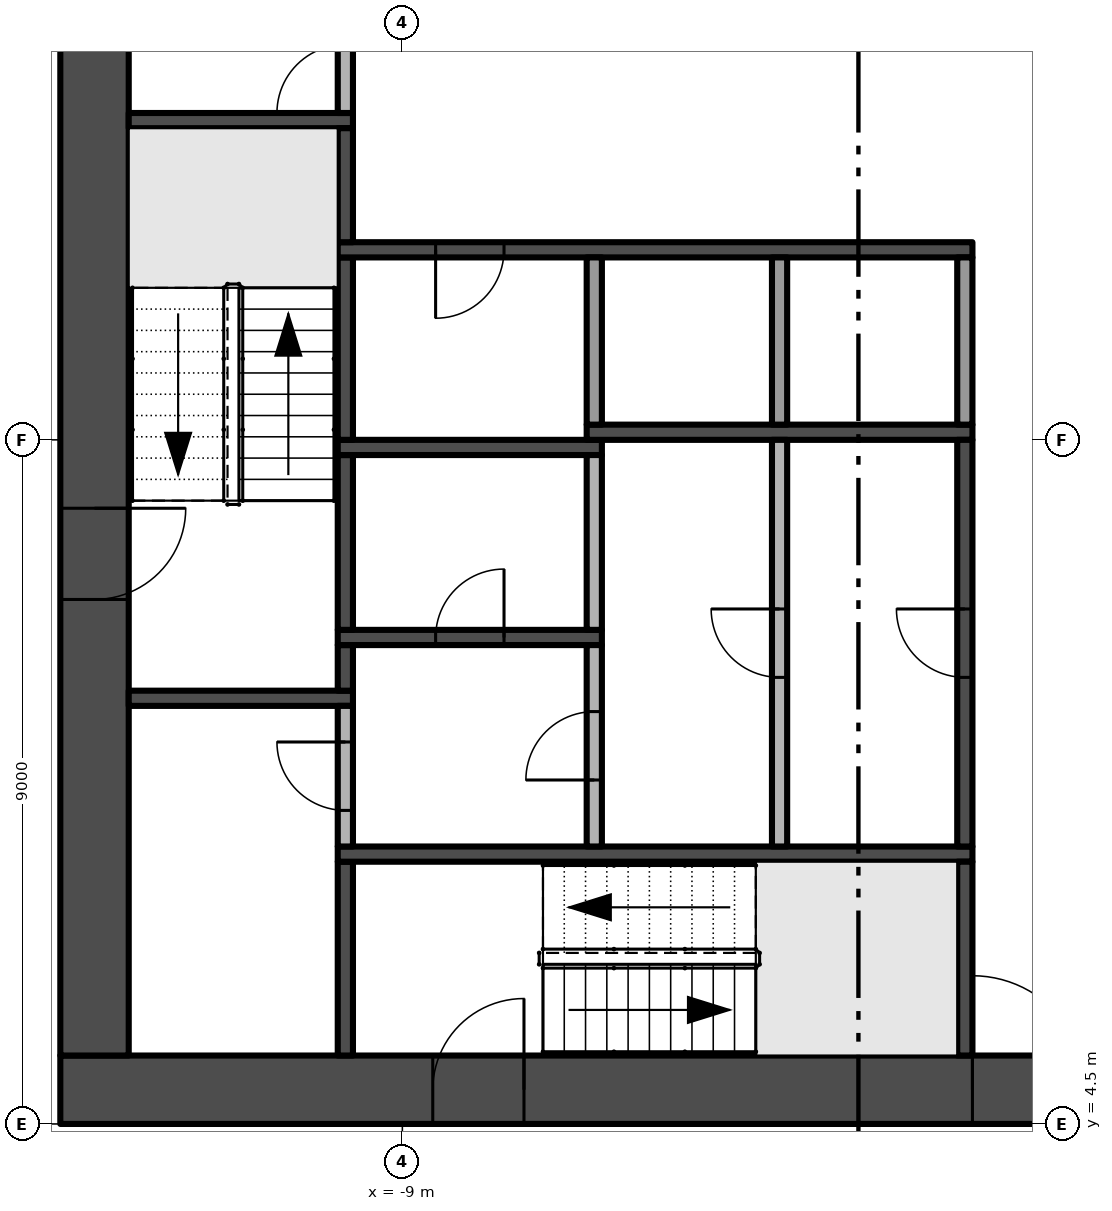
"""IFC4 building model, lengths in metres.
Left out: names, types, materials, properties, quantities, classifications, styles, units other than length and angle.
Written with IfcOpenShell. Run it as: python <this file> out.ifc"""

import sys

from ifc_helpers import new_model, si_unit, direction, frame, frame_2d, origin, place, context, subcontext, project, spatial, rectangle, extrude, element, fill, save


model = new_model("IFC4")
c1 = context("Model", 3, precision=1e-05, world=origin(), true_north=direction((0.0, 1.0)))
c2 = subcontext(c1, "Body", "Model", "MODEL_VIEW")
j1 = project(units=[si_unit("LENGTHUNIT", "METRE"), si_unit("PLANEANGLEUNIT", "RADIAN")], contexts=[c1])
p1 = place(None, origin())
s1 = spatial("IfcSite", under=j1, at=p1, CompositionType="ELEMENT")
p2 = place(p1, origin())
s2 = spatial("IfcBuilding", under=s1, at=p2, CompositionType="ELEMENT")
p3 = place(p2, frame((0.0, 0.0, 34.0)))
s3 = spatial("IfcBuildingStorey", under=s2, at=p3, CompositionType="ELEMENT", Elevation=34.0)
p4 = place(p3, frame((-13.5, 4.95, -0.3), z_axis=(0.0, 0.0, 1.0), x_axis=(1.0, 0.0, 0.0)))
e1 = element("IfcWall", 1, at=p4, inside=s3, PredefinedType="SHEAR", context=c2, shape_type="SweptSolid", body=[
    extrude(rectangle(XDim=27.0, YDim=0.9, at=frame_2d((13.5, 0.0))), origin(), (0.0, 0.0, 1.0), 3.8),
])
p5 = place(p4, frame((12.0, 0.0, 0.3)))
e2 = element("IfcOpeningElement", 2, at=p5, cuts=e1, PredefinedType="OPENING", context=c2, shape_type="SweptSolid", body=[
    extrude(rectangle(XDim=3.0, YDim=2.4, at=frame_2d((1.5, 1.2))), frame((0.0, 0.46, 0.0), z_axis=(0.0, -1.0, 0.0), x_axis=(1.0, 0.0, 0.0)), (0.0, 0.0, 1.0), 0.92),
])
p6 = place(p4, frame((4.9, 0.0, 0.3)))
e3 = element("IfcOpeningElement", 3, at=p6, cuts=e1, PredefinedType="OPENING", context=c2, shape_type="SweptSolid", body=[
    extrude(rectangle(XDim=1.2, YDim=2.2, at=frame_2d((0.6, 1.1))), frame((0.0, 0.46, 0.0), z_axis=(0.0, -1.0, 0.0), x_axis=(1.0, 0.0, 0.0)), (0.0, 0.0, 1.0), 0.92),
])
p7 = place(p4, frame((20.75, 0.0, 0.3)))
e4 = element("IfcOpeningElement", 4, at=p7, cuts=e1, PredefinedType="OPENING", context=c2, shape_type="SweptSolid", body=[
    extrude(rectangle(XDim=1.5, YDim=2.2, at=frame_2d((0.75, 1.1))), frame((0.0, 0.46, 0.0), z_axis=(0.0, -1.0, 0.0), x_axis=(1.0, 0.0, 0.0)), (0.0, 0.0, 1.0), 0.92),
])
p8 = place(p4, frame((17.4, 0.0, 0.3)))
e5 = element("IfcOpeningElement", 5, at=p8, cuts=e1, PredefinedType="OPENING", context=c2, shape_type="SweptSolid", body=[
    extrude(rectangle(XDim=1.2, YDim=2.2, at=frame_2d((0.6, 1.1))), frame((0.0, 0.46, 0.0), z_axis=(0.0, -1.0, 0.0), x_axis=(1.0, 0.0, 0.0)), (0.0, 0.0, 1.0), 0.92),
])
p9 = place(p3, frame((-13.05, 21.6, -0.3), z_axis=(0.0, 0.0, 1.0), x_axis=(0.0, -1.0, 0.0)))
e6 = element("IfcWall", 6, at=p9, inside=s3, PredefinedType="SHEAR", context=c2, shape_type="SweptSolid", body=[
    extrude(rectangle(XDim=16.2, YDim=0.9, at=frame_2d((8.1, 0.0))), origin(), (0.0, 0.0, 1.0), 3.8),
])
p10 = place(p9, frame((9.0, 0.0, 0.3)))
e7 = element("IfcOpeningElement", 7, at=p10, cuts=e6, PredefinedType="OPENING", context=c2, shape_type="SweptSolid", body=[
    extrude(rectangle(XDim=1.2, YDim=2.2, at=frame_2d((0.6, 1.1))), frame((0.0, 0.46, 0.0), z_axis=(0.0, -1.0, 0.0), x_axis=(1.0, 0.0, 0.0)), (0.0, 0.0, 1.0), 0.92),
])
for number, where, z_axis, x_axis in (
    (8, (-12.6, 10.1, 0.0), (0.0, 0.0, 1.0), (1.0, 0.0, 0.0)),
    (9, (-12.6, 17.7, 0.0), (0.0, 0.0, 1.0), (1.0, 0.0, 0.0)),
):
    element("IfcWall", number, at=place(p3, frame(where, z_axis=z_axis, x_axis=x_axis)), inside=s3, PredefinedType="SHEAR", context=c2, shape_type="SweptSolid", body=[
        extrude(rectangle(XDim=2.95, YDim=0.2, at=frame_2d((1.475, 0.0))), origin(), (0.0, 0.0, 1.0), 3.5),
    ])
p11 = place(p3, frame((-9.75, 5.4, 0.0), z_axis=(0.0, 0.0, 1.0), x_axis=(0.0, 1.0, 0.0)))
e10 = element("IfcWall", 10, at=p11, inside=s3, PredefinedType="SHEAR", context=c2, shape_type="SweptSolid", body=[
    extrude(rectangle(XDim=2.55, YDim=0.2, at=frame_2d((1.275, 0.0))), origin(), (0.0, 0.0, 1.0), 3.5),
])
p12 = place(p3, frame((-9.85, 8.05, 0.0), z_axis=(0.0, 0.0, 1.0), x_axis=(1.0, 0.0, 0.0)))
e11 = element("IfcWall", 11, at=p12, inside=s3, PredefinedType="SHEAR", context=c2, shape_type="SweptSolid", body=[
    extrude(rectangle(XDim=8.35, YDim=0.2, at=frame_2d((4.175, 0.0))), origin(), (0.0, 0.0, 1.0), 3.5),
])
p13 = place(p3, frame((-9.75, 8.15, 0.0), z_axis=(0.0, 0.0, 1.0), x_axis=(0.0, 1.0, 0.0)))
e12 = element("IfcWall", 12, at=p13, inside=s3, PredefinedType="PARTITIONING", context=c2, shape_type="SweptSolid", body=[
    extrude(rectangle(XDim=1.85, YDim=0.2, at=frame_2d((0.925, 0.0))), origin(), (0.0, 0.0, 1.0), 3.5),
])
p14 = place(p13, frame((0.475, 0.0, 0.0)))
e13 = element("IfcOpeningElement", 13, at=p14, cuts=e12, PredefinedType="OPENING", context=c2, shape_type="SweptSolid", body=[
    extrude(rectangle(XDim=0.9, YDim=2.1, at=frame_2d((0.45, 1.05))), frame((0.0, 0.11, 0.0), z_axis=(0.0, -1.0, 0.0), x_axis=(1.0, 0.0, 0.0)), (0.0, 0.0, 1.0), 0.22),
])
p15 = place(p3, frame((-9.75, 10.2, 0.0), z_axis=(0.0, 0.0, 1.0), x_axis=(0.0, 1.0, 0.0)))
e14 = element("IfcWall", 14, at=p15, inside=s3, PredefinedType="SHEAR", context=c2, shape_type="SweptSolid", body=[
    extrude(rectangle(XDim=0.6, YDim=0.2, at=frame_2d((0.3, 0.0))), origin(), (0.0, 0.0, 1.0), 3.5),
])
p16 = place(p3, frame((-9.85, 10.9, 0.0), z_axis=(0.0, 0.0, 1.0), x_axis=(1.0, 0.0, 0.0)))
e15 = element("IfcWall", 15, at=p16, inside=s3, PredefinedType="SHEAR", context=c2, shape_type="SweptSolid", body=[
    extrude(rectangle(XDim=3.475, YDim=0.2, at=frame_2d((1.738, 0.0))), origin(), (0.0, 0.0, 1.0), 3.5),
])
p17 = place(p16, frame((1.288, 0.0, 0.0)))
e16 = element("IfcOpeningElement", 16, at=p17, cuts=e15, PredefinedType="OPENING", context=c2, shape_type="SweptSolid", body=[
    extrude(rectangle(XDim=0.9, YDim=2.1, at=frame_2d((0.45, 1.05))), frame((0.0, 0.11, 0.0), z_axis=(0.0, -1.0, 0.0), x_axis=(1.0, 0.0, 0.0)), (0.0, 0.0, 1.0), 0.22),
])
p18 = place(p3, frame((-9.75, 11.0, 0.0), z_axis=(0.0, 0.0, 1.0), x_axis=(0.0, 1.0, 0.0)))
e17 = element("IfcWall", 17, at=p18, inside=s3, PredefinedType="SHEAR", context=c2, shape_type="SweptSolid", body=[
    extrude(rectangle(XDim=2.3, YDim=0.2, at=frame_2d((1.15, 0.0))), origin(), (0.0, 0.0, 1.0), 3.5),
])
p19 = place(p3, frame((-9.85, 13.4, 0.0), z_axis=(0.0, 0.0, 1.0), x_axis=(1.0, 0.0, 0.0)))
e18 = element("IfcWall", 18, at=p19, inside=s3, PredefinedType="SHEAR", context=c2, shape_type="SweptSolid", body=[
    extrude(rectangle(XDim=3.475, YDim=0.2, at=frame_2d((1.738, 0.0))), origin(), (0.0, 0.0, 1.0), 3.5),
])
p20 = place(p3, frame((-9.75, 13.5, 0.0), z_axis=(0.0, 0.0, 1.0), x_axis=(0.0, 1.0, 0.0)))
e19 = element("IfcWall", 19, at=p20, inside=s3, PredefinedType="SHEAR", context=c2, shape_type="SweptSolid", body=[
    extrude(rectangle(XDim=2.4, YDim=0.2, at=frame_2d((1.2, 0.0))), origin(), (0.0, 0.0, 1.0), 3.5),
])
p21 = place(p3, frame((-1.5, 16.0, 0.0), z_axis=(0.0, 0.0, 1.0), x_axis=(-1.0, 0.0, 0.0)))
e20 = element("IfcWall", 20, at=p21, inside=s3, PredefinedType="SHEAR", context=c2, shape_type="SweptSolid", body=[
    extrude(rectangle(XDim=8.35, YDim=0.2, at=frame_2d((4.175, 0.0))), origin(), (0.0, 0.0, 1.0), 3.5),
])
p22 = place(p21, frame((6.162, 0.0, 0.0)))
e21 = element("IfcOpeningElement", 21, at=p22, cuts=e20, PredefinedType="OPENING", context=c2, shape_type="SweptSolid", body=[
    extrude(rectangle(XDim=0.9, YDim=2.1, at=frame_2d((0.45, 1.05))), frame((0.0, 0.11, 0.0), z_axis=(0.0, -1.0, 0.0), x_axis=(1.0, 0.0, 0.0)), (0.0, 0.0, 1.0), 0.22),
])
p23 = place(p3, frame((-9.75, 16.1, 0.0), z_axis=(0.0, 0.0, 1.0), x_axis=(0.0, 1.0, 0.0)))
e22 = element("IfcWall", 22, at=p23, inside=s3, PredefinedType="SHEAR", context=c2, shape_type="SweptSolid", body=[
    extrude(rectangle(XDim=1.5, YDim=0.2, at=frame_2d((0.75, 0.0))), origin(), (0.0, 0.0, 1.0), 3.5),
])
p24 = place(p3, frame((-9.75, 17.8, 0.0), z_axis=(0.0, 0.0, 1.0), x_axis=(0.0, 1.0, 0.0)))
e23 = element("IfcWall", 23, at=p24, inside=s3, PredefinedType="PARTITIONING", context=c2, shape_type="SweptSolid", body=[
    extrude(rectangle(XDim=1.4, YDim=0.2, at=frame_2d((0.7, 0.0))), origin(), (0.0, 0.0, 1.0), 3.5),
])
p25 = place(p24, origin())
e24 = element("IfcOpeningElement", 24, at=p25, cuts=e23, PredefinedType="OPENING", context=c2, shape_type="SweptSolid", body=[
    extrude(rectangle(XDim=0.9, YDim=2.1, at=frame_2d((0.45, 1.05))), frame((0.0, 0.11, 0.0), z_axis=(0.0, -1.0, 0.0), x_axis=(1.0, 0.0, 0.0)), (0.0, 0.0, 1.0), 0.22),
])
p26 = place(p3, frame((-6.475, 8.15, 0.0), z_axis=(0.0, 0.0, 1.0), x_axis=(0.0, 1.0, 0.0)))
e25 = element("IfcWall", 25, at=p26, inside=s3, PredefinedType="PARTITIONING", context=c2, shape_type="SweptSolid", body=[
    extrude(rectangle(XDim=2.65, YDim=0.2, at=frame_2d((1.325, 0.0))), origin(), (0.0, 0.0, 1.0), 3.5),
])
p27 = place(p26, frame((0.875, 0.0, 0.0)))
e26 = element("IfcOpeningElement", 26, at=p27, cuts=e25, PredefinedType="OPENING", context=c2, shape_type="SweptSolid", body=[
    extrude(rectangle(XDim=0.9, YDim=2.1, at=frame_2d((0.45, 1.05))), frame((0.0, 0.11, 0.0), z_axis=(0.0, -1.0, 0.0), x_axis=(1.0, 0.0, 0.0)), (0.0, 0.0, 1.0), 0.22),
])
p28 = place(p3, frame((-6.475, 11.0, 0.0), z_axis=(0.0, 0.0, 1.0), x_axis=(0.0, 1.0, 0.0)))
e27 = element("IfcWall", 27, at=p28, inside=s3, PredefinedType="PARTITIONING", context=c2, shape_type="SweptSolid", body=[
    extrude(rectangle(XDim=2.3, YDim=0.2, at=frame_2d((1.15, 0.0))), origin(), (0.0, 0.0, 1.0), 3.5),
])
p29 = place(p3, frame((-6.575, 13.6, 0.0), z_axis=(0.0, 0.0, 1.0), x_axis=(1.0, 0.0, 0.0)))
e28 = element("IfcWall", 28, at=p29, inside=s3, PredefinedType="SHEAR", context=c2, shape_type="SweptSolid", body=[
    extrude(rectangle(XDim=5.075, YDim=0.2, at=frame_2d((2.538, 0.0))), origin(), (0.0, 0.0, 1.0), 3.5),
])
p30 = place(p3, frame((-6.475, 13.7, 0.0), z_axis=(0.0, 0.0, 1.0), x_axis=(0.0, 1.0, 0.0)))
e29 = element("IfcWall", 29, at=p30, inside=s3, PredefinedType="PARTITIONING", context=c2, shape_type="SweptSolid", body=[
    extrude(rectangle(XDim=2.2, YDim=0.2, at=frame_2d((1.1, 0.0))), origin(), (0.0, 0.0, 1.0), 3.5),
])
p31 = place(p3, frame((-4.037, 8.15, 0.0), z_axis=(0.0, 0.0, 1.0), x_axis=(0.0, 1.0, 0.0)))
e30 = element("IfcWall", 30, at=p31, inside=s3, PredefinedType="PARTITIONING", context=c2, shape_type="SweptSolid", body=[
    extrude(rectangle(XDim=5.35, YDim=0.2, at=frame_2d((2.675, 0.0))), origin(), (0.0, 0.0, 1.0), 3.5),
])
p32 = place(p31, frame((2.225, 0.0, 0.0)))
e31 = element("IfcOpeningElement", 31, at=p32, cuts=e30, PredefinedType="OPENING", context=c2, shape_type="SweptSolid", body=[
    extrude(rectangle(XDim=0.9, YDim=2.1, at=frame_2d((0.45, 1.05))), frame((0.0, 0.11, 0.0), z_axis=(0.0, -1.0, 0.0), x_axis=(1.0, 0.0, 0.0)), (0.0, 0.0, 1.0), 0.22),
])
p33 = place(p3, frame((-4.037, 13.7, 0.0), z_axis=(0.0, 0.0, 1.0), x_axis=(0.0, 1.0, 0.0)))
e32 = element("IfcWall", 32, at=p33, inside=s3, PredefinedType="PARTITIONING", context=c2, shape_type="SweptSolid", body=[
    extrude(rectangle(XDim=2.2, YDim=0.2, at=frame_2d((1.1, 0.0))), origin(), (0.0, 0.0, 1.0), 3.5),
])
p34 = place(p3, frame((-1.6, 5.4, 0.0), z_axis=(0.0, 0.0, 1.0), x_axis=(0.0, 1.0, 0.0)))
e33 = element("IfcWall", 33, at=p34, inside=s3, PredefinedType="SHEAR", context=c2, shape_type="SweptSolid", body=[
    extrude(rectangle(XDim=2.55, YDim=0.2, at=frame_2d((1.275, 0.0))), origin(), (0.0, 0.0, 1.0), 3.5),
])
p35 = place(p3, frame((-1.6, 8.15, 0.0), z_axis=(0.0, 0.0, 1.0), x_axis=(0.0, 1.0, 0.0)))
e34 = element("IfcWall", 34, at=p35, inside=s3, PredefinedType="SHEAR", context=c2, shape_type="SweptSolid", body=[
    extrude(rectangle(XDim=5.35, YDim=0.2, at=frame_2d((2.675, 0.0))), origin(), (0.0, 0.0, 1.0), 3.5),
])
p36 = place(p35, frame((2.225, 0.0, 0.0)))
e35 = element("IfcOpeningElement", 35, at=p36, cuts=e34, PredefinedType="OPENING", context=c2, shape_type="SweptSolid", body=[
    extrude(rectangle(XDim=0.9, YDim=2.1, at=frame_2d((0.45, 1.05))), frame((0.0, 0.11, 0.0), z_axis=(0.0, -1.0, 0.0), x_axis=(1.0, 0.0, 0.0)), (0.0, 0.0, 1.0), 0.22),
])
p37 = place(p3, frame((-1.6, 13.7, 0.0), z_axis=(0.0, 0.0, 1.0), x_axis=(0.0, 1.0, 0.0)))
e36 = element("IfcWall", 36, at=p37, inside=s3, PredefinedType="PARTITIONING", context=c2, shape_type="SweptSolid", body=[
    extrude(rectangle(XDim=2.2, YDim=0.2, at=frame_2d((1.1, 0.0))), origin(), (0.0, 0.0, 1.0), 3.5),
])
p38 = place(p5, frame((3.0, 0.0, 0.0), z_axis=(0.0, 0.0, 1.0), x_axis=(-1.0, 0.0, 0.0)))
e37 = element("IfcDoor", 37, at=p38, inside=s3, OperationType="DOUBLE_DOOR_SINGLE_SWING", PredefinedType="DOOR", context=c2, shape_type="SweptSolid", body=[
    extrude(rectangle(XDim=3.0, YDim=2.4, at=frame_2d((1.5, 1.2))), frame((0.0, 0.025, 0.0), z_axis=(0.0, -1.0, 0.0), x_axis=(1.0, 0.0, 0.0)), (0.0, 0.0, 1.0), 0.05),
])
fill(e2, e37)
p39 = place(p10, frame((1.2, 0.0, 0.0), z_axis=(0.0, 0.0, 1.0), x_axis=(-1.0, 0.0, 0.0)))
e38 = element("IfcDoor", 38, at=p39, inside=s3, OperationType="SINGLE_SWING_RIGHT", PredefinedType="DOOR", context=c2, shape_type="SweptSolid", body=[
    extrude(rectangle(XDim=1.2, YDim=2.2, at=frame_2d((0.6, 1.1))), frame((0.0, 0.025, 0.0), z_axis=(0.0, -1.0, 0.0), x_axis=(1.0, 0.0, 0.0)), (0.0, 0.0, 1.0), 0.05),
])
fill(e7, e38)
p40 = place(p6, frame((1.2, 0.0, 0.0), z_axis=(0.0, 0.0, 1.0), x_axis=(-1.0, 0.0, 0.0)))
e39 = element("IfcDoor", 39, at=p40, inside=s3, OperationType="SINGLE_SWING_LEFT", PredefinedType="DOOR", context=c2, shape_type="SweptSolid", body=[
    extrude(rectangle(XDim=1.2, YDim=2.2, at=frame_2d((0.6, 1.1))), frame((0.0, 0.025, 0.0), z_axis=(0.0, -1.0, 0.0), x_axis=(1.0, 0.0, 0.0)), (0.0, 0.0, 1.0), 0.05),
])
fill(e3, e39)
p41 = place(p22, origin())
e40 = element("IfcDoor", 40, at=p41, inside=s3, OperationType="SINGLE_SWING_RIGHT", PredefinedType="DOOR", context=c2, shape_type="SweptSolid", body=[
    extrude(rectangle(XDim=0.9, YDim=2.1, at=frame_2d((0.45, 1.05))), frame((0.0, 0.025, 0.0), z_axis=(0.0, -1.0, 0.0), x_axis=(1.0, 0.0, 0.0)), (0.0, 0.0, 1.0), 0.05),
])
fill(e21, e40)
p42 = place(p36, origin())
e41 = element("IfcDoor", 41, at=p42, inside=s3, OperationType="SINGLE_SWING_RIGHT", PredefinedType="DOOR", context=c2, shape_type="SweptSolid", body=[
    extrude(rectangle(XDim=0.9, YDim=2.1, at=frame_2d((0.45, 1.05))), frame((0.0, 0.025, 0.0), z_axis=(0.0, -1.0, 0.0), x_axis=(1.0, 0.0, 0.0)), (0.0, 0.0, 1.0), 0.05),
])
fill(e35, e41)
p43 = place(p25, origin())
e42 = element("IfcDoor", 42, at=p43, inside=s3, OperationType="SINGLE_SWING_LEFT", PredefinedType="DOOR", context=c2, shape_type="SweptSolid", body=[
    extrude(rectangle(XDim=0.9, YDim=2.1, at=frame_2d((0.45, 1.05))), frame((0.0, 0.025, 0.0), z_axis=(0.0, -1.0, 0.0), x_axis=(1.0, 0.0, 0.0)), (0.0, 0.0, 1.0), 0.05),
])
fill(e24, e42)
p44 = place(p32, origin())
e43 = element("IfcDoor", 43, at=p44, inside=s3, OperationType="SINGLE_SWING_RIGHT", PredefinedType="DOOR", context=c2, shape_type="SweptSolid", body=[
    extrude(rectangle(XDim=0.9, YDim=2.1, at=frame_2d((0.45, 1.05))), frame((0.0, 0.025, 0.0), z_axis=(0.0, -1.0, 0.0), x_axis=(1.0, 0.0, 0.0)), (0.0, 0.0, 1.0), 0.05),
])
fill(e31, e43)
p45 = place(p27, origin())
e44 = element("IfcDoor", 44, at=p45, inside=s3, OperationType="SINGLE_SWING_LEFT", PredefinedType="DOOR", context=c2, shape_type="SweptSolid", body=[
    extrude(rectangle(XDim=0.9, YDim=2.1, at=frame_2d((0.45, 1.05))), frame((0.0, 0.025, 0.0), z_axis=(0.0, -1.0, 0.0), x_axis=(1.0, 0.0, 0.0)), (0.0, 0.0, 1.0), 0.05),
])
fill(e26, e44)
p46 = place(p17, origin())
e45 = element("IfcDoor", 45, at=p46, inside=s3, OperationType="SINGLE_SWING_RIGHT", PredefinedType="DOOR", context=c2, shape_type="SweptSolid", body=[
    extrude(rectangle(XDim=0.9, YDim=2.1, at=frame_2d((0.45, 1.05))), frame((0.0, 0.025, 0.0), z_axis=(0.0, -1.0, 0.0), x_axis=(1.0, 0.0, 0.0)), (0.0, 0.0, 1.0), 0.05),
])
fill(e16, e45)
p47 = place(p14, origin())
e46 = element("IfcDoor", 46, at=p47, inside=s3, OperationType="SINGLE_SWING_RIGHT", PredefinedType="DOOR", context=c2, shape_type="SweptSolid", body=[
    extrude(rectangle(XDim=0.9, YDim=2.1, at=frame_2d((0.45, 1.05))), frame((0.0, 0.025, 0.0), z_axis=(0.0, -1.0, 0.0), x_axis=(1.0, 0.0, 0.0)), (0.0, 0.0, 1.0), 0.05),
])
fill(e13, e46)
save(model, sys.argv[1])
